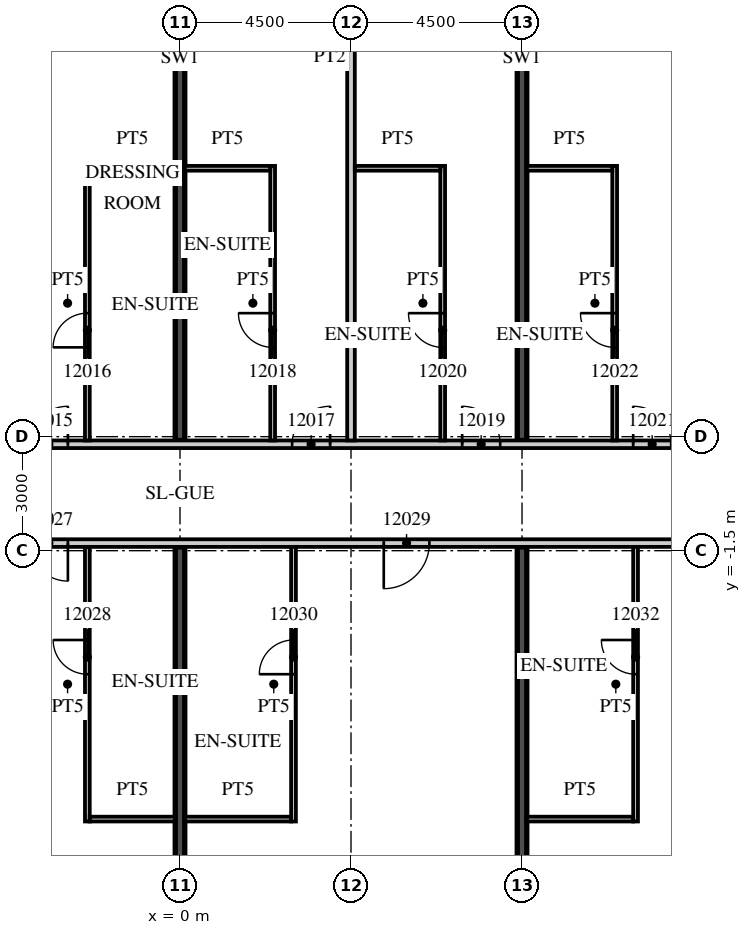
"""IFC4 building model, lengths in metres.
Left out: names, types, materials, properties, quantities, classifications, styles, units other than length and angle.
Written with IfcOpenShell. Run it as: python <this file> out.ifc"""

import sys

from ifc_helpers import new_model, si_unit, direction, frame, frame_2d, origin, place, context, subcontext, project, spatial, rectangle, extrude, element, fill, save


model = new_model("IFC4")
c1 = context("Model", 3, precision=1e-05, world=origin(), true_north=direction((0.0, 1.0)))
c2 = subcontext(c1, "Body", "Model", "MODEL_VIEW")
j1 = project(units=[si_unit("LENGTHUNIT", "METRE"), si_unit("PLANEANGLEUNIT", "RADIAN")], contexts=[c1])
p1 = place(None, origin())
s1 = spatial("IfcSite", under=j1, at=p1, CompositionType="ELEMENT")
p2 = place(p1, origin())
s2 = spatial("IfcBuilding", under=s1, at=p2, CompositionType="ELEMENT")
p3 = place(p2, frame((0.0, 0.0, 69.9)))
s3 = spatial("IfcBuildingStorey", under=s2, at=p3, CompositionType="ELEMENT", Elevation=69.9)
for number, where, z_axis, x_axis in (
    (1, (0.0, -21.54, 0.0), (0.0, 0.0, 1.0), (0.0, 1.0, 0.0)),
    (2, (0.0, 1.4, 0.0), (0.0, 0.0, 1.0), (0.0, 1.0, 0.0)),
    (3, (9.0, -21.54, 0.0), (0.0, 0.0, 1.0), (0.0, 1.0, 0.0)),
    (4, (9.0, 1.4, 0.0), (0.0, 0.0, 1.0), (0.0, 1.0, 0.0)),
):
    element("IfcWall", number, at=place(p3, frame(where, z_axis=z_axis, x_axis=x_axis)), inside=s3, PredefinedType="SHEAR", context=c2, shape_type="SweptSolid", body=[
        extrude(rectangle(XDim=20.14, YDim=0.25, at=frame_2d((10.07, 0.0))), origin(), (0.0, 0.0, 1.0), 3.3),
    ])
p4 = place(p3, frame((-44.55, 1.3, 0.0), z_axis=(0.0, 0.0, 1.0), x_axis=(1.0, 0.0, 0.0)))
e5 = element("IfcWall", 5, at=p4, inside=s3, PredefinedType="PARTITIONING", context=c2, shape_type="SweptSolid", body=[
    extrude(rectangle(XDim=58.05, YDim=0.2, at=frame_2d((29.025, 0.0))), origin(), (0.0, 0.0, 1.0), 3.02),
])
p5 = place(p4, frame((0.525, 0.0, 0.0)))
e6 = element("IfcOpeningElement", 6, at=p5, cuts=e5, PredefinedType="OPENING", context=c2, shape_type="SweptSolid", body=[
    extrude(rectangle(XDim=1.0, YDim=2.1, at=frame_2d((0.5, 1.05))), frame((0.0, 0.11, 0.0), z_axis=(0.0, -1.0, 0.0), x_axis=(1.0, 0.0, 0.0)), (0.0, 0.0, 1.0), 0.22),
])
p6 = place(p4, frame((6.975, 0.0, 0.0)))
e7 = element("IfcOpeningElement", 7, at=p6, cuts=e5, PredefinedType="OPENING", context=c2, shape_type="SweptSolid", body=[
    extrude(rectangle(XDim=1.0, YDim=2.1, at=frame_2d((0.5, 1.05))), frame((0.0, 0.11, 0.0), z_axis=(0.0, -1.0, 0.0), x_axis=(1.0, 0.0, 0.0)), (0.0, 0.0, 1.0), 0.22),
])
p7 = place(p4, frame((9.125, 0.0, 0.0)))
e8 = element("IfcOpeningElement", 8, at=p7, cuts=e5, PredefinedType="OPENING", context=c2, shape_type="SweptSolid", body=[
    extrude(rectangle(XDim=1.0, YDim=2.1, at=frame_2d((0.5, 1.05))), frame((0.0, 0.11, 0.0), z_axis=(0.0, -1.0, 0.0), x_axis=(1.0, 0.0, 0.0)), (0.0, 0.0, 1.0), 0.22),
])
p8 = place(p4, frame((13.6, 0.0, 0.0)))
e9 = element("IfcOpeningElement", 9, at=p8, cuts=e5, PredefinedType="OPENING", context=c2, shape_type="SweptSolid", body=[
    extrude(rectangle(XDim=1.0, YDim=2.1, at=frame_2d((0.5, 1.05))), frame((0.0, 0.11, 0.0), z_axis=(0.0, -1.0, 0.0), x_axis=(1.0, 0.0, 0.0)), (0.0, 0.0, 1.0), 0.22),
])
p9 = place(p4, frame((19.987, 0.0, 0.0)))
e10 = element("IfcOpeningElement", 10, at=p9, cuts=e5, PredefinedType="OPENING", context=c2, shape_type="SweptSolid", body=[
    extrude(rectangle(XDim=1.2, YDim=2.1, at=frame_2d((0.6, 1.05))), frame((0.0, 0.11, 0.0), z_axis=(0.0, -1.0, 0.0), x_axis=(1.0, 0.0, 0.0)), (0.0, 0.0, 1.0), 0.22),
])
p10 = place(p4, frame((31.912, 0.0, 0.0)))
e11 = element("IfcOpeningElement", 11, at=p10, cuts=e5, PredefinedType="OPENING", context=c2, shape_type="SweptSolid", body=[
    extrude(rectangle(XDim=1.2, YDim=2.1, at=frame_2d((0.6, 1.05))), frame((0.0, 0.11, 0.0), z_axis=(0.0, -1.0, 0.0), x_axis=(1.0, 0.0, 0.0)), (0.0, 0.0, 1.0), 0.22),
])
p11 = place(p4, frame((38.5, 0.0, 0.0)))
e12 = element("IfcOpeningElement", 12, at=p11, cuts=e5, PredefinedType="OPENING", context=c2, shape_type="SweptSolid", body=[
    extrude(rectangle(XDim=1.0, YDim=2.1, at=frame_2d((0.5, 1.05))), frame((0.0, 0.11, 0.0), z_axis=(0.0, -1.0, 0.0), x_axis=(1.0, 0.0, 0.0)), (0.0, 0.0, 1.0), 0.22),
])
p12 = place(p4, frame((40.6, 0.0, 0.0)))
e13 = element("IfcOpeningElement", 13, at=p12, cuts=e5, PredefinedType="OPENING", context=c2, shape_type="SweptSolid", body=[
    extrude(rectangle(XDim=1.0, YDim=2.1, at=frame_2d((0.5, 1.05))), frame((0.0, 0.11, 0.0), z_axis=(0.0, -1.0, 0.0), x_axis=(1.0, 0.0, 0.0)), (0.0, 0.0, 1.0), 0.22),
])
p13 = place(p4, frame((47.5, 0.0, 0.0)))
e14 = element("IfcOpeningElement", 14, at=p13, cuts=e5, PredefinedType="OPENING", context=c2, shape_type="SweptSolid", body=[
    extrude(rectangle(XDim=1.0, YDim=2.1, at=frame_2d((0.5, 1.05))), frame((0.0, 0.11, 0.0), z_axis=(0.0, -1.0, 0.0), x_axis=(1.0, 0.0, 0.0)), (0.0, 0.0, 1.0), 0.22),
])
p14 = place(p4, frame((51.975, 0.0, 0.0)))
e15 = element("IfcOpeningElement", 15, at=p14, cuts=e5, PredefinedType="OPENING", context=c2, shape_type="SweptSolid", body=[
    extrude(rectangle(XDim=1.0, YDim=2.1, at=frame_2d((0.5, 1.05))), frame((0.0, 0.11, 0.0), z_axis=(0.0, -1.0, 0.0), x_axis=(1.0, 0.0, 0.0)), (0.0, 0.0, 1.0), 0.22),
])
p15 = place(p4, frame((56.475, 0.0, 0.0)))
e16 = element("IfcOpeningElement", 16, at=p15, cuts=e5, PredefinedType="OPENING", context=c2, shape_type="SweptSolid", body=[
    extrude(rectangle(XDim=1.0, YDim=2.1, at=frame_2d((0.5, 1.05))), frame((0.0, 0.11, 0.0), z_axis=(0.0, -1.0, 0.0), x_axis=(1.0, 0.0, 0.0)), (0.0, 0.0, 1.0), 0.22),
])
p16 = place(p3, frame((-2.438, 1.4, 0.0), z_axis=(0.0, 0.0, 1.0), x_axis=(0.0, 1.0, 0.0)))
e17 = element("IfcWall", 17, at=p16, inside=s3, PredefinedType="PARTITIONING", context=c2, shape_type="SweptSolid", body=[
    extrude(rectangle(XDim=7.225, YDim=0.125, at=frame_2d((3.613, 0.0))), origin(), (0.0, 0.0, 1.0), 3.02),
])
p17 = place(p16, frame((2.45, 0.0, 0.0)))
e18 = element("IfcOpeningElement", 18, at=p17, cuts=e17, PredefinedType="OPENING", context=c2, shape_type="SweptSolid", body=[
    extrude(rectangle(XDim=0.9, YDim=2.1, at=frame_2d((0.45, 1.05))), frame((0.0, 0.073, 0.0), z_axis=(0.0, -1.0, 0.0), x_axis=(1.0, 0.0, 0.0)), (0.0, 0.0, 1.0), 0.145),
])
p18 = place(p3, frame((-2.375, 8.562, 0.0), z_axis=(0.0, 0.0, 1.0), x_axis=(1.0, 0.0, 0.0)))
e19 = element("IfcWall", 19, at=p18, inside=s3, PredefinedType="PARTITIONING", context=c2, shape_type="SweptSolid", body=[
    extrude(rectangle(XDim=2.25, YDim=0.125, at=frame_2d((1.125, 0.0))), origin(), (0.0, 0.0, 1.0), 3.02),
])
p19 = place(p3, frame((4.5, 1.4, 0.0), z_axis=(0.0, 0.0, 1.0), x_axis=(0.0, 1.0, 0.0)))
e20 = element("IfcWall", 20, at=p19, inside=s3, PredefinedType="PARTITIONING", context=c2, shape_type="SweptSolid", body=[
    extrude(rectangle(XDim=20.15, YDim=0.2, at=frame_2d((10.075, 0.0))), origin(), (0.0, 0.0, 1.0), 3.02),
])
p20 = place(p3, frame((2.438, 1.4, 0.0), z_axis=(0.0, 0.0, 1.0), x_axis=(0.0, 1.0, 0.0)))
e21 = element("IfcWall", 21, at=p20, inside=s3, PredefinedType="PARTITIONING", context=c2, shape_type="SweptSolid", body=[
    extrude(rectangle(XDim=7.225, YDim=0.125, at=frame_2d((3.613, 0.0))), origin(), (0.0, 0.0, 1.0), 3.02),
])
p21 = place(p20, frame((2.45, 0.0, 0.0)))
e22 = element("IfcOpeningElement", 22, at=p21, cuts=e21, PredefinedType="OPENING", context=c2, shape_type="SweptSolid", body=[
    extrude(rectangle(XDim=0.9, YDim=2.1, at=frame_2d((0.45, 1.05))), frame((0.0, 0.073, 0.0), z_axis=(0.0, -1.0, 0.0), x_axis=(1.0, 0.0, 0.0)), (0.0, 0.0, 1.0), 0.145),
])
p22 = place(p3, frame((0.125, 8.562, 0.0), z_axis=(0.0, 0.0, 1.0), x_axis=(1.0, 0.0, 0.0)))
e23 = element("IfcWall", 23, at=p22, inside=s3, PredefinedType="PARTITIONING", context=c2, shape_type="SweptSolid", body=[
    extrude(rectangle(XDim=2.25, YDim=0.125, at=frame_2d((1.125, 0.0))), origin(), (0.0, 0.0, 1.0), 3.02),
])
p23 = place(p3, frame((6.912, 1.4, 0.0), z_axis=(0.0, 0.0, 1.0), x_axis=(0.0, 1.0, 0.0)))
e24 = element("IfcWall", 24, at=p23, inside=s3, PredefinedType="PARTITIONING", context=c2, shape_type="SweptSolid", body=[
    extrude(rectangle(XDim=7.225, YDim=0.125, at=frame_2d((3.613, 0.0))), origin(), (0.0, 0.0, 1.0), 3.02),
])
p24 = place(p23, frame((2.45, 0.0, 0.0)))
e25 = element("IfcOpeningElement", 25, at=p24, cuts=e24, PredefinedType="OPENING", context=c2, shape_type="SweptSolid", body=[
    extrude(rectangle(XDim=0.9, YDim=2.1, at=frame_2d((0.45, 1.05))), frame((0.0, 0.073, 0.0), z_axis=(0.0, -1.0, 0.0), x_axis=(1.0, 0.0, 0.0)), (0.0, 0.0, 1.0), 0.145),
])
p25 = place(p3, frame((4.6, 8.562, 0.0), z_axis=(0.0, 0.0, 1.0), x_axis=(1.0, 0.0, 0.0)))
e26 = element("IfcWall", 26, at=p25, inside=s3, PredefinedType="PARTITIONING", context=c2, shape_type="SweptSolid", body=[
    extrude(rectangle(XDim=2.25, YDim=0.125, at=frame_2d((1.125, 0.0))), origin(), (0.0, 0.0, 1.0), 3.02),
])
p26 = place(p3, frame((11.438, 1.4, 0.0), z_axis=(0.0, 0.0, 1.0), x_axis=(0.0, 1.0, 0.0)))
e27 = element("IfcWall", 27, at=p26, inside=s3, PredefinedType="PARTITIONING", context=c2, shape_type="SweptSolid", body=[
    extrude(rectangle(XDim=7.225, YDim=0.125, at=frame_2d((3.613, 0.0))), origin(), (0.0, 0.0, 1.0), 3.02),
])
p27 = place(p26, frame((2.45, 0.0, 0.0)))
e28 = element("IfcOpeningElement", 28, at=p27, cuts=e27, PredefinedType="OPENING", context=c2, shape_type="SweptSolid", body=[
    extrude(rectangle(XDim=0.9, YDim=2.1, at=frame_2d((0.45, 1.05))), frame((0.0, 0.073, 0.0), z_axis=(0.0, -1.0, 0.0), x_axis=(1.0, 0.0, 0.0)), (0.0, 0.0, 1.0), 0.145),
])
p28 = place(p3, frame((9.125, 8.562, 0.0), z_axis=(0.0, 0.0, 1.0), x_axis=(1.0, 0.0, 0.0)))
e29 = element("IfcWall", 29, at=p28, inside=s3, PredefinedType="PARTITIONING", context=c2, shape_type="SweptSolid", body=[
    extrude(rectangle(XDim=2.25, YDim=0.125, at=frame_2d((1.125, 0.0))), origin(), (0.0, 0.0, 1.0), 3.02),
])
p29 = place(p3, frame((-13.5, -1.3, 0.0), z_axis=(0.0, 0.0, 1.0), x_axis=(1.0, 0.0, 0.0)))
e30 = element("IfcWall", 30, at=p29, inside=s3, PredefinedType="PARTITIONING", context=c2, shape_type="SweptSolid", body=[
    extrude(rectangle(XDim=58.05, YDim=0.2, at=frame_2d((29.025, 0.0))), origin(), (0.0, 0.0, 1.0), 3.02),
])
p30 = place(p29, frame((2.925, 0.0, 0.0)))
e31 = element("IfcOpeningElement", 31, at=p30, cuts=e30, PredefinedType="OPENING", context=c2, shape_type="SweptSolid", body=[
    extrude(rectangle(XDim=1.0, YDim=2.1, at=frame_2d((0.5, 1.05))), frame((0.0, 0.11, 0.0), z_axis=(0.0, -1.0, 0.0), x_axis=(1.0, 0.0, 0.0)), (0.0, 0.0, 1.0), 0.22),
])
p31 = place(p29, frame((5.075, 0.0, 0.0)))
e32 = element("IfcOpeningElement", 32, at=p31, cuts=e30, PredefinedType="OPENING", context=c2, shape_type="SweptSolid", body=[
    extrude(rectangle(XDim=1.0, YDim=2.1, at=frame_2d((0.5, 1.05))), frame((0.0, 0.11, 0.0), z_axis=(0.0, -1.0, 0.0), x_axis=(1.0, 0.0, 0.0)), (0.0, 0.0, 1.0), 0.22),
])
p32 = place(p29, frame((9.55, 0.0, 0.0)))
e33 = element("IfcOpeningElement", 33, at=p32, cuts=e30, PredefinedType="OPENING", context=c2, shape_type="SweptSolid", body=[
    extrude(rectangle(XDim=1.0, YDim=2.1, at=frame_2d((0.5, 1.05))), frame((0.0, 0.11, 0.0), z_axis=(0.0, -1.0, 0.0), x_axis=(1.0, 0.0, 0.0)), (0.0, 0.0, 1.0), 0.22),
])
p33 = place(p29, frame((18.862, 0.0, 0.0)))
e34 = element("IfcOpeningElement", 34, at=p33, cuts=e30, PredefinedType="OPENING", context=c2, shape_type="SweptSolid", body=[
    extrude(rectangle(XDim=1.2, YDim=2.1, at=frame_2d((0.6, 1.05))), frame((0.0, 0.11, 0.0), z_axis=(0.0, -1.0, 0.0), x_axis=(1.0, 0.0, 0.0)), (0.0, 0.0, 1.0), 0.22),
])
p34 = place(p29, frame((27.862, 0.0, 0.0)))
e35 = element("IfcOpeningElement", 35, at=p34, cuts=e30, PredefinedType="OPENING", context=c2, shape_type="SweptSolid", body=[
    extrude(rectangle(XDim=1.2, YDim=2.1, at=frame_2d((0.6, 1.05))), frame((0.0, 0.11, 0.0), z_axis=(0.0, -1.0, 0.0), x_axis=(1.0, 0.0, 0.0)), (0.0, 0.0, 1.0), 0.22),
])
p35 = place(p29, frame((34.45, 0.0, 0.0)))
e36 = element("IfcOpeningElement", 36, at=p35, cuts=e30, PredefinedType="OPENING", context=c2, shape_type="SweptSolid", body=[
    extrude(rectangle(XDim=1.0, YDim=2.1, at=frame_2d((0.5, 1.05))), frame((0.0, 0.11, 0.0), z_axis=(0.0, -1.0, 0.0), x_axis=(1.0, 0.0, 0.0)), (0.0, 0.0, 1.0), 0.22),
])
p36 = place(p29, frame((38.925, 0.0, 0.0)))
e37 = element("IfcOpeningElement", 37, at=p36, cuts=e30, PredefinedType="OPENING", context=c2, shape_type="SweptSolid", body=[
    extrude(rectangle(XDim=1.0, YDim=2.1, at=frame_2d((0.5, 1.05))), frame((0.0, 0.11, 0.0), z_axis=(0.0, -1.0, 0.0), x_axis=(1.0, 0.0, 0.0)), (0.0, 0.0, 1.0), 0.22),
])
p37 = place(p29, frame((45.862, 0.0, 0.0)))
e38 = element("IfcOpeningElement", 38, at=p37, cuts=e30, PredefinedType="OPENING", context=c2, shape_type="SweptSolid", body=[
    extrude(rectangle(XDim=1.2, YDim=2.1, at=frame_2d((0.6, 1.05))), frame((0.0, 0.11, 0.0), z_axis=(0.0, -1.0, 0.0), x_axis=(1.0, 0.0, 0.0)), (0.0, 0.0, 1.0), 0.22),
])
p38 = place(p29, frame((50.075, 0.0, 0.0)))
e39 = element("IfcOpeningElement", 39, at=p38, cuts=e30, PredefinedType="OPENING", context=c2, shape_type="SweptSolid", body=[
    extrude(rectangle(XDim=1.0, YDim=2.1, at=frame_2d((0.5, 1.05))), frame((0.0, 0.11, 0.0), z_axis=(0.0, -1.0, 0.0), x_axis=(1.0, 0.0, 0.0)), (0.0, 0.0, 1.0), 0.22),
])
p39 = place(p29, frame((56.525, 0.0, 0.0)))
e40 = element("IfcOpeningElement", 40, at=p39, cuts=e30, PredefinedType="OPENING", context=c2, shape_type="SweptSolid", body=[
    extrude(rectangle(XDim=1.0, YDim=2.1, at=frame_2d((0.5, 1.05))), frame((0.0, 0.11, 0.0), z_axis=(0.0, -1.0, 0.0), x_axis=(1.0, 0.0, 0.0)), (0.0, 0.0, 1.0), 0.22),
])
p40 = place(p3, frame((-2.438, -8.625, 0.0), z_axis=(0.0, 0.0, 1.0), x_axis=(0.0, 1.0, 0.0)))
e41 = element("IfcWall", 41, at=p40, inside=s3, PredefinedType="PARTITIONING", context=c2, shape_type="SweptSolid", body=[
    extrude(rectangle(XDim=7.225, YDim=0.125, at=frame_2d((3.613, 0.0))), origin(), (0.0, 0.0, 1.0), 3.02),
])
p41 = place(p40, frame((3.875, 0.0, 0.0)))
e42 = element("IfcOpeningElement", 42, at=p41, cuts=e41, PredefinedType="OPENING", context=c2, shape_type="SweptSolid", body=[
    extrude(rectangle(XDim=0.9, YDim=2.1, at=frame_2d((0.45, 1.05))), frame((0.0, 0.073, 0.0), z_axis=(0.0, -1.0, 0.0), x_axis=(1.0, 0.0, 0.0)), (0.0, 0.0, 1.0), 0.145),
])
p42 = place(p3, frame((-2.375, -8.562, 0.0), z_axis=(0.0, 0.0, 1.0), x_axis=(1.0, 0.0, 0.0)))
e43 = element("IfcWall", 43, at=p42, inside=s3, PredefinedType="PARTITIONING", context=c2, shape_type="SweptSolid", body=[
    extrude(rectangle(XDim=2.25, YDim=0.125, at=frame_2d((1.125, 0.0))), origin(), (0.0, 0.0, 1.0), 3.02),
])
p43 = place(p3, frame((2.987, -8.625, 0.0), z_axis=(0.0, 0.0, 1.0), x_axis=(0.0, 1.0, 0.0)))
e44 = element("IfcWall", 44, at=p43, inside=s3, PredefinedType="PARTITIONING", context=c2, shape_type="SweptSolid", body=[
    extrude(rectangle(XDim=7.225, YDim=0.125, at=frame_2d((3.613, 0.0))), origin(), (0.0, 0.0, 1.0), 3.02),
])
p44 = place(p43, frame((3.875, 0.0, 0.0)))
e45 = element("IfcOpeningElement", 45, at=p44, cuts=e44, PredefinedType="OPENING", context=c2, shape_type="SweptSolid", body=[
    extrude(rectangle(XDim=0.9, YDim=2.1, at=frame_2d((0.45, 1.05))), frame((0.0, 0.073, 0.0), z_axis=(0.0, -1.0, 0.0), x_axis=(1.0, 0.0, 0.0)), (0.0, 0.0, 1.0), 0.145),
])
p45 = place(p3, frame((0.125, -8.562, 0.0), z_axis=(0.0, 0.0, 1.0), x_axis=(1.0, 0.0, 0.0)))
e46 = element("IfcWall", 46, at=p45, inside=s3, PredefinedType="PARTITIONING", context=c2, shape_type="SweptSolid", body=[
    extrude(rectangle(XDim=2.8, YDim=0.125, at=frame_2d((1.4, 0.0))), origin(), (0.0, 0.0, 1.0), 3.02),
])
p46 = place(p3, frame((11.988, -8.625, 0.0), z_axis=(0.0, 0.0, 1.0), x_axis=(0.0, 1.0, 0.0)))
e47 = element("IfcWall", 47, at=p46, inside=s3, PredefinedType="PARTITIONING", context=c2, shape_type="SweptSolid", body=[
    extrude(rectangle(XDim=7.225, YDim=0.125, at=frame_2d((3.613, 0.0))), origin(), (0.0, 0.0, 1.0), 3.02),
])
p47 = place(p46, frame((3.875, 0.0, 0.0)))
e48 = element("IfcOpeningElement", 48, at=p47, cuts=e47, PredefinedType="OPENING", context=c2, shape_type="SweptSolid", body=[
    extrude(rectangle(XDim=0.9, YDim=2.1, at=frame_2d((0.45, 1.05))), frame((0.0, 0.073, 0.0), z_axis=(0.0, -1.0, 0.0), x_axis=(1.0, 0.0, 0.0)), (0.0, 0.0, 1.0), 0.145),
])
p48 = place(p3, frame((9.125, -8.562, 0.0), z_axis=(0.0, 0.0, 1.0), x_axis=(1.0, 0.0, 0.0)))
e49 = element("IfcWall", 49, at=p48, inside=s3, PredefinedType="PARTITIONING", context=c2, shape_type="SweptSolid", body=[
    extrude(rectangle(XDim=2.8, YDim=0.125, at=frame_2d((1.4, 0.0))), origin(), (0.0, 0.0, 1.0), 3.02),
])
p49 = place(p12, origin())
e50 = element("IfcDoor", 50, at=p49, inside=s3, OperationType="SINGLE_SWING_RIGHT", PredefinedType="DOOR", context=c2, shape_type="SweptSolid", body=[
    extrude(rectangle(XDim=1.0, YDim=2.1, at=frame_2d((0.5, 1.05))), frame((0.0, 0.025, 0.0), z_axis=(0.0, -1.0, 0.0), x_axis=(1.0, 0.0, 0.0)), (0.0, 0.0, 1.0), 0.05),
])
fill(e13, e50)
p50 = place(p17, origin())
e51 = element("IfcDoor", 51, at=p50, inside=s3, OperationType="SINGLE_SWING_LEFT", PredefinedType="DOOR", context=c2, shape_type="SweptSolid", body=[
    extrude(rectangle(XDim=0.9, YDim=2.1, at=frame_2d((0.45, 1.05))), frame((0.0, 0.025, 0.0), z_axis=(0.0, -1.0, 0.0), x_axis=(1.0, 0.0, 0.0)), (0.0, 0.0, 1.0), 0.05),
])
fill(e18, e51)
p51 = place(p13, origin())
e52 = element("IfcDoor", 52, at=p51, inside=s3, OperationType="SINGLE_SWING_RIGHT", PredefinedType="DOOR", context=c2, shape_type="SweptSolid", body=[
    extrude(rectangle(XDim=1.0, YDim=2.1, at=frame_2d((0.5, 1.05))), frame((0.0, 0.025, 0.0), z_axis=(0.0, -1.0, 0.0), x_axis=(1.0, 0.0, 0.0)), (0.0, 0.0, 1.0), 0.05),
])
fill(e14, e52)
p52 = place(p21, origin())
e53 = element("IfcDoor", 53, at=p52, inside=s3, OperationType="SINGLE_SWING_RIGHT", PredefinedType="DOOR", context=c2, shape_type="SweptSolid", body=[
    extrude(rectangle(XDim=0.9, YDim=2.1, at=frame_2d((0.45, 1.05))), frame((0.0, 0.025, 0.0), z_axis=(0.0, -1.0, 0.0), x_axis=(1.0, 0.0, 0.0)), (0.0, 0.0, 1.0), 0.05),
])
fill(e22, e53)
p53 = place(p14, origin())
e54 = element("IfcDoor", 54, at=p53, inside=s3, OperationType="SINGLE_SWING_LEFT", PredefinedType="DOOR", context=c2, shape_type="SweptSolid", body=[
    extrude(rectangle(XDim=1.0, YDim=2.1, at=frame_2d((0.5, 1.05))), frame((0.0, 0.025, 0.0), z_axis=(0.0, -1.0, 0.0), x_axis=(1.0, 0.0, 0.0)), (0.0, 0.0, 1.0), 0.05),
])
fill(e15, e54)
p54 = place(p24, origin())
e55 = element("IfcDoor", 55, at=p54, inside=s3, OperationType="SINGLE_SWING_RIGHT", PredefinedType="DOOR", context=c2, shape_type="SweptSolid", body=[
    extrude(rectangle(XDim=0.9, YDim=2.1, at=frame_2d((0.45, 1.05))), frame((0.0, 0.025, 0.0), z_axis=(0.0, -1.0, 0.0), x_axis=(1.0, 0.0, 0.0)), (0.0, 0.0, 1.0), 0.05),
])
fill(e25, e55)
p55 = place(p15, origin())
e56 = element("IfcDoor", 56, at=p55, inside=s3, OperationType="SINGLE_SWING_LEFT", PredefinedType="DOOR", context=c2, shape_type="SweptSolid", body=[
    extrude(rectangle(XDim=1.0, YDim=2.1, at=frame_2d((0.5, 1.05))), frame((0.0, 0.025, 0.0), z_axis=(0.0, -1.0, 0.0), x_axis=(1.0, 0.0, 0.0)), (0.0, 0.0, 1.0), 0.05),
])
fill(e16, e56)
p56 = place(p27, origin())
e57 = element("IfcDoor", 57, at=p56, inside=s3, OperationType="SINGLE_SWING_RIGHT", PredefinedType="DOOR", context=c2, shape_type="SweptSolid", body=[
    extrude(rectangle(XDim=0.9, YDim=2.1, at=frame_2d((0.45, 1.05))), frame((0.0, 0.025, 0.0), z_axis=(0.0, -1.0, 0.0), x_axis=(1.0, 0.0, 0.0)), (0.0, 0.0, 1.0), 0.05),
])
fill(e28, e57)
p57 = place(p32, origin())
e58 = element("IfcDoor", 58, at=p57, inside=s3, OperationType="SINGLE_SWING_RIGHT", PredefinedType="DOOR", context=c2, shape_type="SweptSolid", body=[
    extrude(rectangle(XDim=1.0, YDim=2.1, at=frame_2d((0.5, 1.05))), frame((0.0, 0.025, 0.0), z_axis=(0.0, -1.0, 0.0), x_axis=(1.0, 0.0, 0.0)), (0.0, 0.0, 1.0), 0.05),
])
fill(e33, e58)
p58 = place(p41, origin())
e59 = element("IfcDoor", 59, at=p58, inside=s3, OperationType="SINGLE_SWING_RIGHT", PredefinedType="DOOR", context=c2, shape_type="SweptSolid", body=[
    extrude(rectangle(XDim=0.9, YDim=2.1, at=frame_2d((0.45, 1.05))), frame((0.0, 0.025, 0.0), z_axis=(0.0, -1.0, 0.0), x_axis=(1.0, 0.0, 0.0)), (0.0, 0.0, 1.0), 0.05),
])
fill(e42, e59)
p59 = place(p33, origin())
e60 = element("IfcDoor", 60, at=p59, inside=s3, OperationType="SINGLE_SWING_LEFT", PredefinedType="DOOR", context=c2, shape_type="SweptSolid", body=[
    extrude(rectangle(XDim=1.2, YDim=2.1, at=frame_2d((0.6, 1.05))), frame((0.0, 0.025, 0.0), z_axis=(0.0, -1.0, 0.0), x_axis=(1.0, 0.0, 0.0)), (0.0, 0.0, 1.0), 0.05),
])
fill(e34, e60)
p60 = place(p44, origin())
e61 = element("IfcDoor", 61, at=p60, inside=s3, OperationType="SINGLE_SWING_LEFT", PredefinedType="DOOR", context=c2, shape_type="SweptSolid", body=[
    extrude(rectangle(XDim=0.9, YDim=2.1, at=frame_2d((0.45, 1.05))), frame((0.0, 0.025, 0.0), z_axis=(0.0, -1.0, 0.0), x_axis=(1.0, 0.0, 0.0)), (0.0, 0.0, 1.0), 0.05),
])
fill(e45, e61)
p61 = place(p47, origin())
e62 = element("IfcDoor", 62, at=p61, inside=s3, OperationType="SINGLE_SWING_RIGHT", PredefinedType="DOOR", context=c2, shape_type="SweptSolid", body=[
    extrude(rectangle(XDim=0.9, YDim=2.1, at=frame_2d((0.45, 1.05))), frame((0.0, 0.025, 0.0), z_axis=(0.0, -1.0, 0.0), x_axis=(1.0, 0.0, 0.0)), (0.0, 0.0, 1.0), 0.05),
])
fill(e48, e62)
save(model, sys.argv[1])
